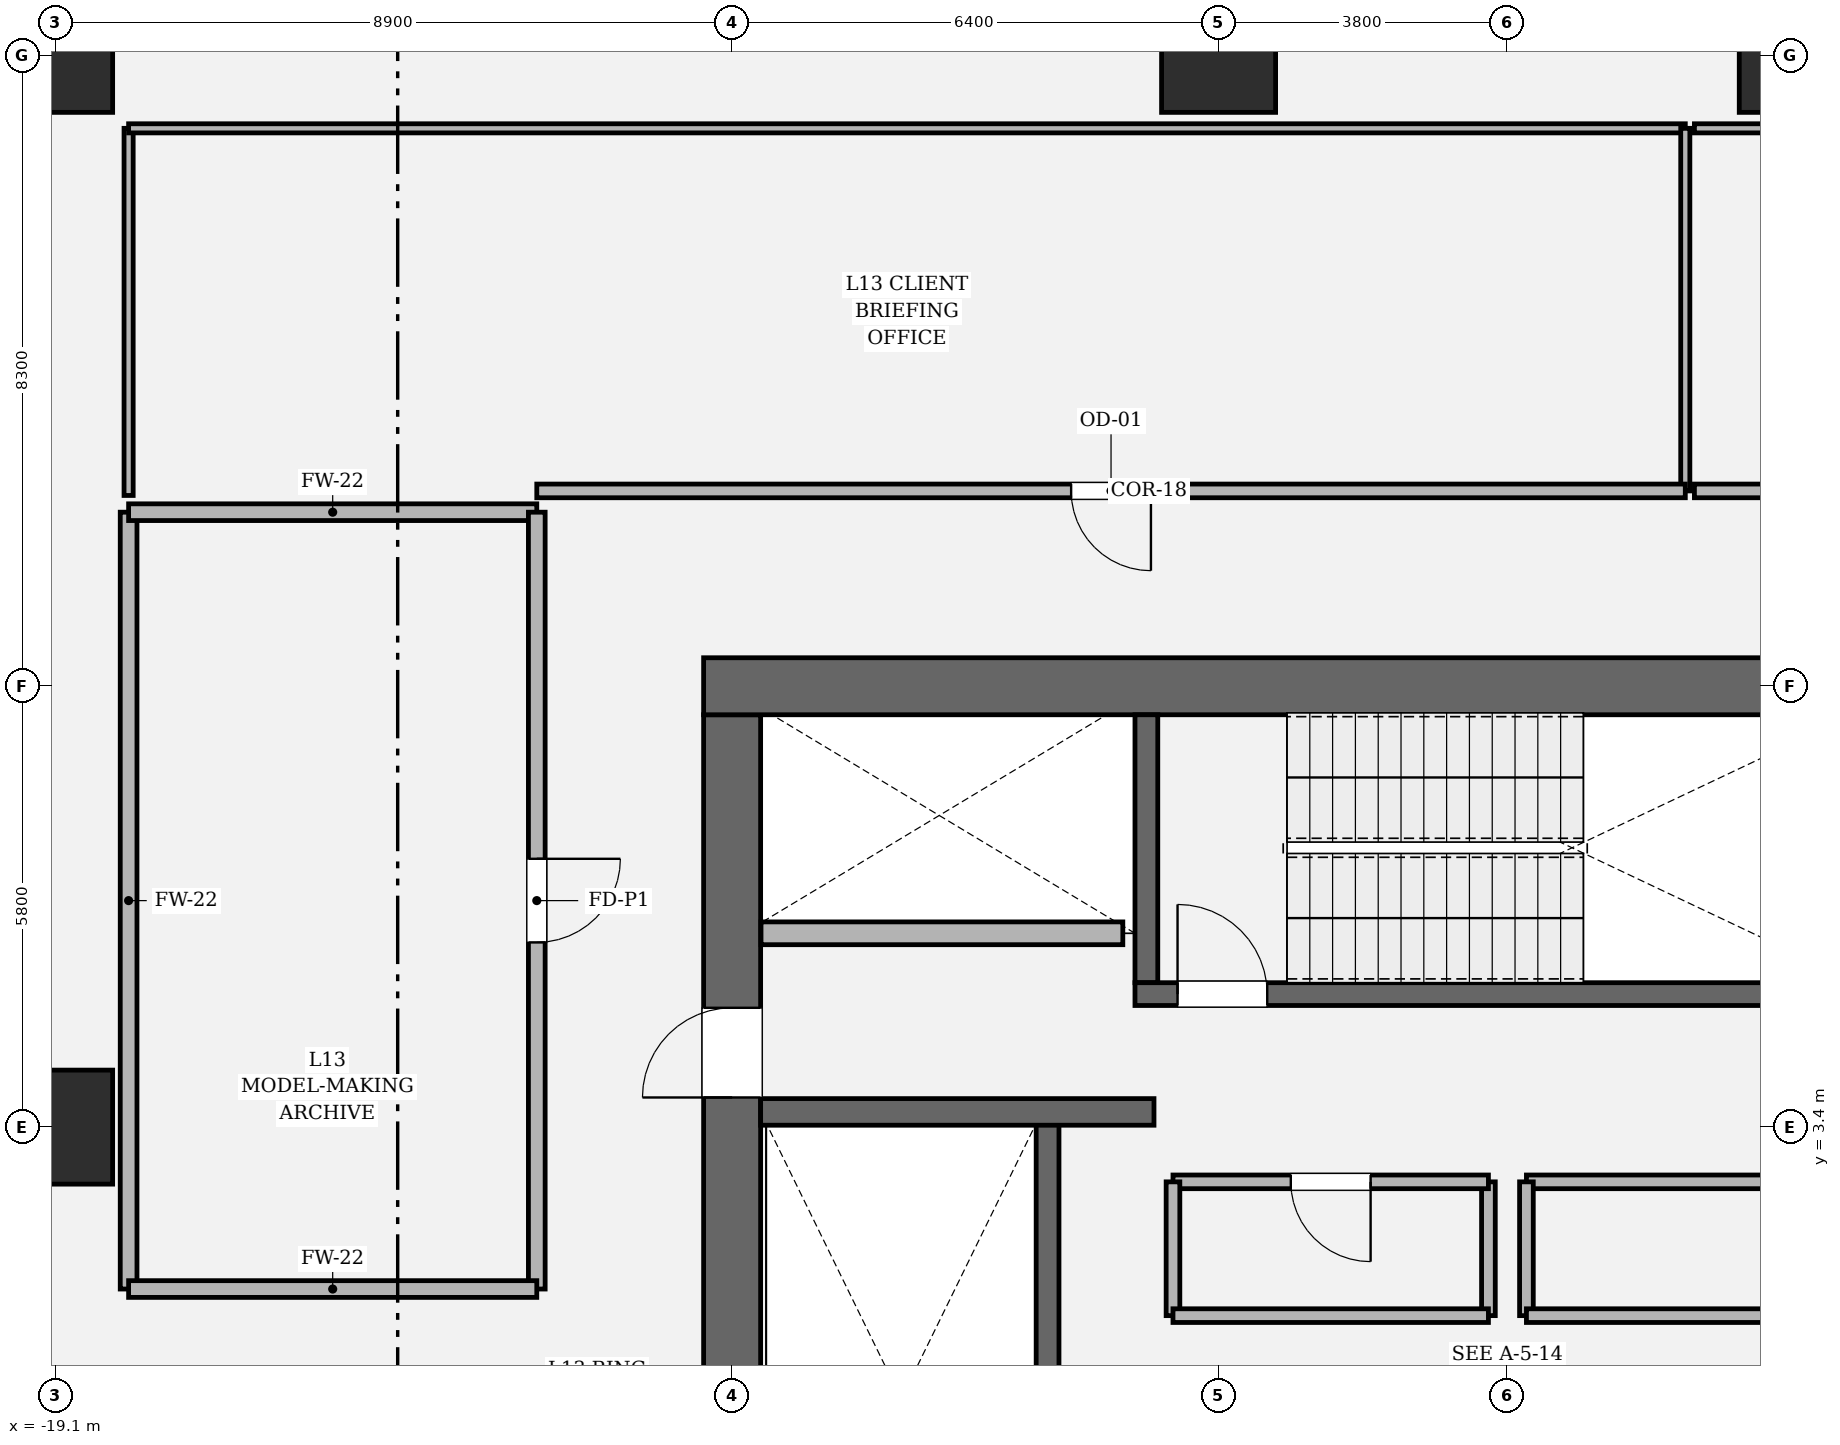
"""IFC4 building model, lengths in metres.
Left out: names, types, materials, properties, quantities, classifications, styles, units other than length and angle.
Written with IfcOpenShell. Run it as: python <this file> out.ifc"""

import sys

from ifc_helpers import new_model, si_unit, direction, frame, frame_2d, origin, origin_2d, place, context, subcontext, project, spatial, rectangle, hollow_rectangle, extrude, element, fill, save


model = new_model("IFC4")
c1 = context("Model", 3, precision=1e-05, world=origin(), true_north=direction((0.0, 1.0)))
c2 = subcontext(c1, "Body", "Model", "MODEL_VIEW")
j1 = project(units=[si_unit("LENGTHUNIT", "METRE"), si_unit("PLANEANGLEUNIT", "RADIAN")], contexts=[c1])
p1 = place(None, origin())
s1 = spatial("IfcSite", under=j1, at=p1, CompositionType="ELEMENT")
p2 = place(p1, origin())
s2 = spatial("IfcBuilding", under=s1, at=p2, CompositionType="ELEMENT")
p3 = place(p2, frame((0.0, 0.0, 60.6)))
s3 = spatial("IfcBuildingStorey", under=s2, at=p3, CompositionType="ELEMENT", Elevation=60.6)
p4 = place(p3, frame((-10.2, -8.825, 0.0), z_axis=(0.0, 0.0, 1.0), x_axis=(0.0, 1.0, 0.0)))
e1 = element("IfcWall", 1, at=p4, inside=s3, PredefinedType="SHEAR", context=c2, shape_type="SweptSolid", body=[
    extrude(rectangle(XDim=17.65, YDim=0.75, at=frame_2d((8.825, 0.0))), origin(), (0.0, 0.0, 1.0), 4.05),
])
p5 = place(p4, frame((12.615, 0.0, 0.0)))
e2 = element("IfcOpeningElement", 2, at=p5, cuts=e1, PredefinedType="OPENING", context=c2, shape_type="SweptSolid", body=[
    extrude(rectangle(XDim=1.18, YDim=2.2, at=frame_2d((0.59, 1.1))), frame((0.0, 0.385, 0.0), z_axis=(0.0, -1.0, 0.0), x_axis=(1.0, 0.0, 0.0)), (0.0, 0.0, 1.0), 0.77),
])
p6 = place(p3, frame((-10.575, 9.2, 0.0), z_axis=(0.0, 0.0, 1.0), x_axis=(1.0, 0.0, 0.0)))
e3 = element("IfcWall", 3, at=p6, inside=s3, PredefinedType="SHEAR", context=c2, shape_type="SweptSolid", body=[
    extrude(rectangle(XDim=21.15, YDim=0.75, at=frame_2d((10.575, 0.0))), origin(), (0.0, 0.0, 1.0), 4.05),
])
p7 = place(p3, frame((-6.05, -5.5, 0.0), z_axis=(0.0, 0.0, 1.0), x_axis=(0.0, 1.0, 0.0)))
e4 = element("IfcWall", 4, at=p7, inside=s3, PredefinedType="SOLIDWALL", context=c2, shape_type="SweptSolid", body=[
    extrude(rectangle(XDim=8.95, YDim=0.3, at=frame_2d((4.475, 0.0))), origin(), (0.0, 0.0, 1.0), 4.05),
])
p8 = place(p3, frame((-4.75, 5.3, 0.0), z_axis=(0.0, 0.0, 1.0), x_axis=(0.0, 1.0, 0.0)))
e5 = element("IfcWall", 5, at=p8, inside=s3, PredefinedType="SOLIDWALL", context=c2, shape_type="SweptSolid", body=[
    extrude(rectangle(XDim=3.525, YDim=0.3, at=frame_2d((1.762, 0.0))), origin(), (0.0, 0.0, 1.0), 4.05),
])
p9 = place(p3, frame((-4.9, 5.15, 0.0), z_axis=(0.0, 0.0, 1.0), x_axis=(1.0, 0.0, 0.0)))
e6 = element("IfcWall", 6, at=p9, inside=s3, PredefinedType="SOLIDWALL", context=c2, shape_type="SweptSolid", body=[
    extrude(rectangle(XDim=9.8, YDim=0.3, at=frame_2d((4.9, 0.0))), origin(), (0.0, 0.0, 1.0), 4.05),
])
p10 = place(p9, frame((0.56, 0.0, 0.0)))
e7 = element("IfcOpeningElement", 7, at=p10, cuts=e6, PredefinedType="OPENING", context=c2, shape_type="SweptSolid", body=[
    extrude(rectangle(XDim=1.18, YDim=2.2, at=frame_2d((0.59, 1.1))), frame((0.0, 0.16, 0.0), z_axis=(0.0, -1.0, 0.0), x_axis=(1.0, 0.0, 0.0)), (0.0, 0.0, 1.0), 0.32),
])
p11 = place(p3, frame((-9.825, 3.6, 0.0), z_axis=(0.0, 0.0, 1.0), x_axis=(1.0, 0.0, 0.0)))
e8 = element("IfcWall", 8, at=p11, inside=s3, PredefinedType="SOLIDWALL", context=c2, shape_type="SweptSolid", body=[
    extrude(rectangle(XDim=5.175, YDim=0.35, at=frame_2d((2.587, 0.0))), origin(), (0.0, 0.0, 1.0), 4.05),
])
for number, where, z_axis, x_axis in (
    (9, (3.8, 17.5, 0.0), (0.0, 0.0, 1.0), (1.0, 0.0, 0.0)),
    (10, (-3.8, 17.5, 0.0), (0.0, 0.0, 1.0), (1.0, 0.0, 0.0)),
    (11, (-19.1, 17.5, 0.0), (0.0, 0.0, 1.0), (1.0, 0.0, 0.0)),
    (12, (-19.1, 3.4, 0.0), (0.0, 0.0, 1.0), (1.0, 0.0, 0.0)),
):
    element("IfcColumn", number, at=place(p3, frame(where, z_axis=z_axis, x_axis=x_axis)), inside=s3, PredefinedType="COLUMN", context=c2, shape_type="SweptSolid", body=[
        extrude(hollow_rectangle(XDim=1.5, YDim=1.5, WallThickness=0.045, at=origin_2d()), origin(), (0.0, 0.0, 1.0), 4.05),
    ])
p12 = place(p3, frame((-18.549, 18.047, 0.0), z_axis=(0.0, 0.0, 1.0), x_axis=(-0.707106781187, -0.707106781187, 0.0)))
e13 = element("IfcWall", 13, at=p12, inside=s3, PredefinedType="SOLIDWALL", context=c2, shape_type="SweptSolid", body=[
    extrude(rectangle(XDim=1.552, YDim=0.32, at=frame_2d((0.776, 0.0))), origin(), (0.0, 0.0, 1.0), 3.104),
])
p13 = place(p3, frame((-9.82, 5.95, 0.0), z_axis=(0.0, 0.0, 1.0), x_axis=(1.0, 0.0, 0.0)))
e14 = element("IfcWall", 14, at=p13, inside=s3, PredefinedType="SOLIDWALL", context=c2, shape_type="SweptSolid", body=[
    extrude(rectangle(XDim=4.76, YDim=0.3, at=frame_2d((2.38, 0.0))), origin(), (0.0, 0.0, 1.0), 3.81),
])
p14 = place(p3, frame((-0.25, 0.92, 0.0), z_axis=(0.0, 0.0, 1.0), x_axis=(0.0, 1.0, 0.0)))
e15 = element("IfcWall", 15, at=p14, inside=s3, PredefinedType="PARTITIONING", context=c2, shape_type="SweptSolid", body=[
    extrude(rectangle(XDim=1.76, YDim=0.18, at=frame_2d((0.88, 0.0))), origin(), (0.0, 0.0, 1.0), 3.81),
])
p15 = place(p3, frame((-0.25, 2.68, 0.0), z_axis=(0.0, 0.0, 1.0), x_axis=(-1.0, 0.0, 0.0)))
e16 = element("IfcWall", 16, at=p15, inside=s3, PredefinedType="PARTITIONING", context=c2, shape_type="SweptSolid", body=[
    extrude(rectangle(XDim=4.15, YDim=0.18, at=frame_2d((2.075, 0.0))), origin(), (0.0, 0.0, 1.0), 3.81),
])
p16 = place(p15, frame((1.55, 0.0, 0.0)))
e17 = element("IfcOpeningElement", 17, at=p16, cuts=e16, PredefinedType="OPENING", context=c2, shape_type="SweptSolid", body=[
    extrude(rectangle(XDim=1.05, YDim=2.2, at=frame_2d((0.525, 1.1))), frame((0.0, 0.1, 0.0), z_axis=(0.0, -1.0, 0.0), x_axis=(1.0, 0.0, 0.0)), (0.0, 0.0, 1.0), 0.2),
])
p17 = place(p3, frame((-4.4, 2.68, 0.0), z_axis=(0.0, 0.0, 1.0), x_axis=(0.0, -1.0, 0.0)))
e18 = element("IfcWall", 18, at=p17, inside=s3, PredefinedType="PARTITIONING", context=c2, shape_type="SweptSolid", body=[
    extrude(rectangle(XDim=1.76, YDim=0.18, at=frame_2d((0.88, 0.0))), origin(), (0.0, 0.0, 1.0), 3.81),
])
for number, where, z_axis, x_axis in (
    (19, (-4.4, 0.92, 0.0), (0.0, 0.0, 1.0), (1.0, 0.0, 0.0)),
    (20, (4.4, 2.68, 0.0), (0.0, 0.0, 1.0), (-1.0, 0.0, 0.0)),
):
    element("IfcWall", number, at=place(p3, frame(where, z_axis=z_axis, x_axis=x_axis)), inside=s3, PredefinedType="PARTITIONING", context=c2, shape_type="SweptSolid", body=[
        extrude(rectangle(XDim=4.15, YDim=0.18, at=frame_2d((2.075, 0.0))), origin(), (0.0, 0.0, 1.0), 3.81),
    ])
p18 = place(p3, frame((0.25, 2.68, 0.0), z_axis=(0.0, 0.0, 1.0), x_axis=(0.0, -1.0, 0.0)))
e21 = element("IfcWall", 21, at=p18, inside=s3, PredefinedType="PARTITIONING", context=c2, shape_type="SweptSolid", body=[
    extrude(rectangle(XDim=1.76, YDim=0.18, at=frame_2d((0.88, 0.0))), origin(), (0.0, 0.0, 1.0), 3.81),
])
p19 = place(p3, frame((0.25, 0.92, 0.0), z_axis=(0.0, 0.0, 1.0), x_axis=(1.0, 0.0, 0.0)))
e22 = element("IfcWall", 22, at=p19, inside=s3, PredefinedType="PARTITIONING", context=c2, shape_type="SweptSolid", body=[
    extrude(rectangle(XDim=4.15, YDim=0.18, at=frame_2d((2.075, 0.0))), origin(), (0.0, 0.0, 1.0), 3.81),
])
p20 = place(p3, frame((-18.14, 1.27, 0.0), z_axis=(0.0, 0.0, 1.0), x_axis=(0.0, 1.0, 0.0)))
e23 = element("IfcWall", 23, at=p20, inside=s3, PredefinedType="SOLIDWALL", context=c2, shape_type="SweptSolid", body=[
    extrude(rectangle(XDim=10.22, YDim=0.22, at=frame_2d((5.11, 0.0))), origin(), (0.0, 0.0, 1.0), 3.104),
])
p21 = place(p3, frame((-18.14, 11.49, 0.0), z_axis=(0.0, 0.0, 1.0), x_axis=(1.0, 0.0, 0.0)))
e24 = element("IfcWall", 24, at=p21, inside=s3, PredefinedType="SOLIDWALL", context=c2, shape_type="SweptSolid", body=[
    extrude(rectangle(XDim=5.37, YDim=0.22, at=frame_2d((2.685, 0.0))), origin(), (0.0, 0.0, 1.0), 3.354),
])
p22 = place(p3, frame((-12.77, 11.49, 0.0), z_axis=(0.0, 0.0, 1.0), x_axis=(0.0, -1.0, 0.0)))
e25 = element("IfcWall", 25, at=p22, inside=s3, PredefinedType="SOLIDWALL", context=c2, shape_type="SweptSolid", body=[
    extrude(rectangle(XDim=10.22, YDim=0.22, at=frame_2d((5.11, 0.0))), origin(), (0.0, 0.0, 1.0), 3.104),
])
p23 = place(p22, frame((4.56, 0.0, 0.0)))
e26 = element("IfcOpeningElement", 26, at=p23, cuts=e25, PredefinedType="OPENING", context=c2, shape_type="SweptSolid", body=[
    extrude(rectangle(XDim=1.1, YDim=2.2, at=frame_2d((0.55, 1.1))), frame((0.0, 0.12, 0.0), z_axis=(0.0, -1.0, 0.0), x_axis=(1.0, 0.0, 0.0)), (0.0, 0.0, 1.0), 0.24),
])
p24 = place(p3, frame((-12.77, 1.27, 0.0), z_axis=(0.0, 0.0, 1.0), x_axis=(-1.0, 0.0, 0.0)))
e27 = element("IfcWall", 27, at=p24, inside=s3, PredefinedType="SOLIDWALL", context=c2, shape_type="SweptSolid", body=[
    extrude(rectangle(XDim=5.37, YDim=0.22, at=frame_2d((2.685, 0.0))), origin(), (0.0, 0.0, 1.0), 3.81),
])
p25 = place(p3, frame((-18.14, 11.71, 0.0), z_axis=(0.0, 0.0, 1.0), x_axis=(0.0, 1.0, 0.0)))
e28 = element("IfcWall", 28, at=p25, inside=s3, PredefinedType="PARTITIONING", context=c2, shape_type="SweptSolid", body=[
    extrude(rectangle(XDim=4.83, YDim=0.12, at=frame_2d((2.415, 0.0))), origin(), (0.0, 0.0, 1.0), 3.354),
])
p26 = place(p3, frame((-18.14, 16.54, 0.0), z_axis=(0.0, 0.0, 1.0), x_axis=(1.0, 0.0, 0.0)))
e29 = element("IfcWall", 29, at=p26, inside=s3, PredefinedType="PARTITIONING", context=c2, shape_type="SweptSolid", body=[
    extrude(rectangle(XDim=20.48, YDim=0.12, at=frame_2d((10.24, 0.0))), origin(), (0.0, 0.0, 1.0), 3.104),
])
p27 = place(p3, frame((2.34, 16.54, 0.0), z_axis=(0.0, 0.0, 1.0), x_axis=(0.0, -1.0, 0.0)))
e30 = element("IfcWall", 30, at=p27, inside=s3, PredefinedType="PARTITIONING", context=c2, shape_type="SweptSolid", body=[
    extrude(rectangle(XDim=4.77, YDim=0.12, at=frame_2d((2.385, 0.0))), origin(), (0.0, 0.0, 1.0), 3.81),
])
p28 = place(p3, frame((2.34, 11.77, 0.0), z_axis=(0.0, 0.0, 1.0), x_axis=(-1.0, 0.0, 0.0)))
e31 = element("IfcWall", 31, at=p28, inside=s3, PredefinedType="PARTITIONING", context=c2, shape_type="SweptSolid", body=[
    extrude(rectangle(XDim=15.11, YDim=0.18, at=frame_2d((7.555, 0.0))), origin(), (0.0, 0.0, 1.0), 3.104),
])
p29 = place(p28, frame((7.03, 0.0, 0.0)))
e32 = element("IfcOpeningElement", 32, at=p29, cuts=e31, PredefinedType="OPENING", context=c2, shape_type="SweptSolid", body=[
    extrude(rectangle(XDim=1.05, YDim=2.2, at=frame_2d((0.525, 1.1))), frame((0.0, 0.1, 0.0), z_axis=(0.0, -1.0, 0.0), x_axis=(1.0, 0.0, 0.0)), (0.0, 0.0, 1.0), 0.2),
])
p30 = place(p3, frame((2.46, 16.54, 0.0), z_axis=(0.0, 0.0, 1.0), x_axis=(1.0, 0.0, 0.0)))
e33 = element("IfcWall", 33, at=p30, inside=s3, PredefinedType="PARTITIONING", context=c2, shape_type="SweptSolid", body=[
    extrude(rectangle(XDim=21.58, YDim=0.12, at=frame_2d((10.79, 0.0))), origin(), (0.0, 0.0, 1.0), 3.104),
])
p31 = place(p3, frame((12.77, 11.77, 0.0), z_axis=(0.0, 0.0, 1.0), x_axis=(-1.0, 0.0, 0.0)))
e34 = element("IfcWall", 34, at=p31, inside=s3, PredefinedType="PARTITIONING", context=c2, shape_type="SweptSolid", body=[
    extrude(rectangle(XDim=10.31, YDim=0.18, at=frame_2d((5.155, 0.0))), origin(), (0.0, 0.0, 1.0), 3.104),
])
p32 = place(p31, frame((4.455, 0.0, 0.0)))
e35 = element("IfcOpeningElement", 35, at=p32, cuts=e34, PredefinedType="OPENING", context=c2, shape_type="SweptSolid", body=[
    extrude(rectangle(XDim=1.4, YDim=2.25, at=frame_2d((0.7, 1.125))), frame((0.0, 0.1, 0.0), z_axis=(0.0, -1.0, 0.0), x_axis=(1.0, 0.0, 0.0)), (0.0, 0.0, 1.0), 0.2),
])
p33 = place(p10, origin())
e36 = element("IfcDoor", 36, at=p33, inside=s3, OperationType="SINGLE_SWING_LEFT", PredefinedType="DOOR", context=c2, shape_type="SweptSolid", body=[
    extrude(rectangle(XDim=1.18, YDim=2.2, at=frame_2d((0.59, 1.1))), frame((0.0, 0.025, 0.0), z_axis=(0.0, -1.0, 0.0), x_axis=(1.0, 0.0, 0.0)), (0.0, 0.0, 1.0), 0.05),
])
fill(e7, e36)
p34 = place(p5, origin())
e37 = element("IfcDoor", 37, at=p34, inside=s3, OperationType="SINGLE_SWING_LEFT", PredefinedType="DOOR", context=c2, shape_type="SweptSolid", body=[
    extrude(rectangle(XDim=1.18, YDim=2.2, at=frame_2d((0.59, 1.1))), frame((0.0, 0.025, 0.0), z_axis=(0.0, -1.0, 0.0), x_axis=(1.0, 0.0, 0.0)), (0.0, 0.0, 1.0), 0.05),
])
fill(e2, e37)
p35 = place(p16, origin())
e38 = element("IfcDoor", 38, at=p35, inside=s3, OperationType="SINGLE_SWING_LEFT", PredefinedType="DOOR", context=c2, shape_type="SweptSolid", body=[
    extrude(rectangle(XDim=1.05, YDim=2.2, at=frame_2d((0.525, 1.1))), frame((0.0, 0.025, 0.0), z_axis=(0.0, -1.0, 0.0), x_axis=(1.0, 0.0, 0.0)), (0.0, 0.0, 1.0), 0.05),
])
fill(e17, e38)
p36 = place(p23, origin())
e39 = element("IfcDoor", 39, at=p36, inside=s3, OperationType="SINGLE_SWING_LEFT", PredefinedType="DOOR", context=c2, shape_type="SweptSolid", body=[
    extrude(rectangle(XDim=1.1, YDim=2.2, at=frame_2d((0.55, 1.1))), frame((0.0, 0.025, 0.0), z_axis=(0.0, -1.0, 0.0), x_axis=(1.0, 0.0, 0.0)), (0.0, 0.0, 1.0), 0.05),
])
fill(e26, e39)
p37 = place(p29, origin())
e40 = element("IfcDoor", 40, at=p37, inside=s3, OperationType="SINGLE_SWING_LEFT", PredefinedType="DOOR", context=c2, shape_type="SweptSolid", body=[
    extrude(rectangle(XDim=1.05, YDim=2.2, at=frame_2d((0.525, 1.1))), frame((0.0, 0.025, 0.0), z_axis=(0.0, -1.0, 0.0), x_axis=(1.0, 0.0, 0.0)), (0.0, 0.0, 1.0), 0.05),
])
fill(e32, e40)
save(model, sys.argv[1])
